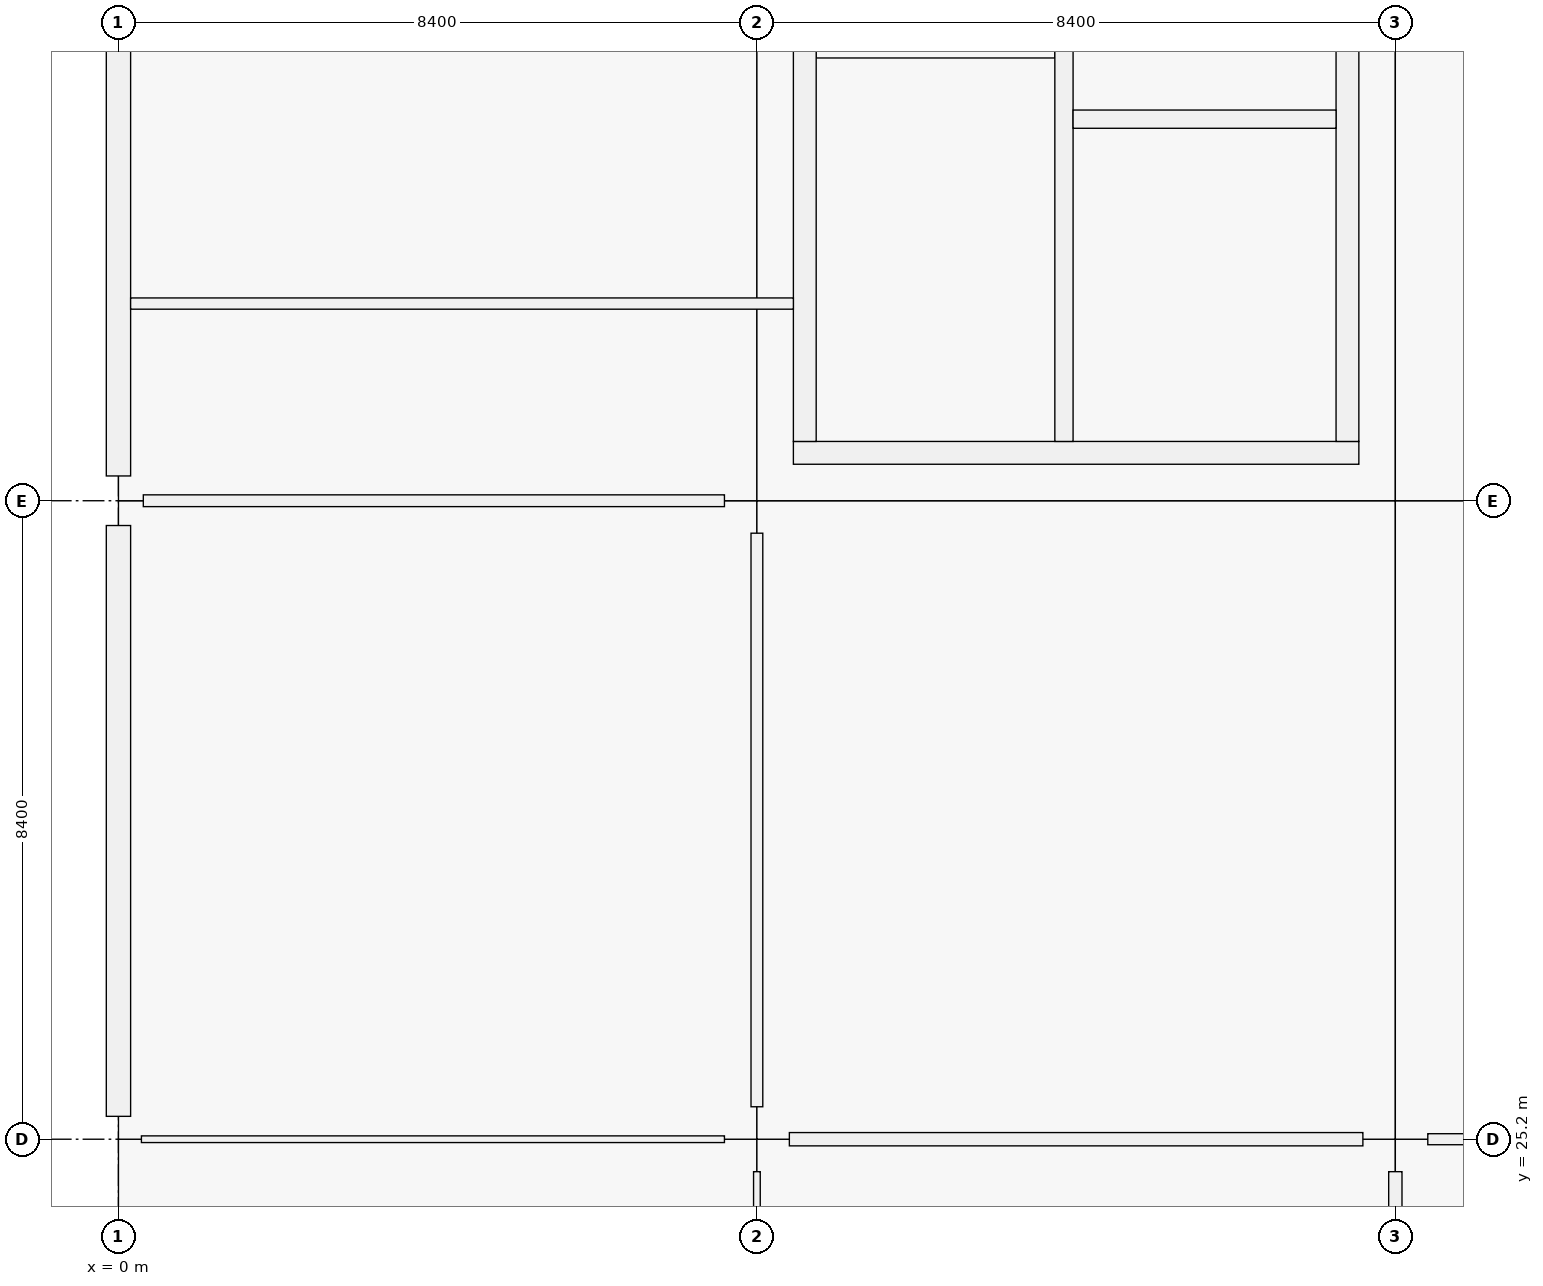
"""IFC4 building model, lengths in metres.
Left out: names, types, materials, properties, quantities, classifications, styles, units other than length and angle.
Written with IfcOpenShell. Run it as: python <this file> out.ifc"""

import sys

from ifc_helpers import new_model, si_unit, direction, frame, frame_2d, origin, origin_2d, place, context, subcontext, project, spatial, rectangle, extrude, element, fill, save


model = new_model("IFC4")
c1 = context("Model", 3, precision=1e-05, world=origin(), true_north=direction((0.0, 1.0)))
c2 = subcontext(c1, "Body", "Model", "MODEL_VIEW")
j1 = project(units=[si_unit("LENGTHUNIT", "METRE"), si_unit("PLANEANGLEUNIT", "RADIAN")], contexts=[c1])
p1 = place(None, origin())
s1 = spatial("IfcSite", under=j1, at=p1, CompositionType="ELEMENT")
p2 = place(p1, origin())
s2 = spatial("IfcBuilding", under=s1, at=p2, CompositionType="ELEMENT")
p3 = place(p2, origin())
s3 = spatial("IfcBuildingStorey", under=s2, at=p3, CompositionType="ELEMENT", Elevation=0.0)
p4 = place(p3, frame((0.0, 25.2, 0.0), z_axis=(0.0, 0.0, 1.0), x_axis=(1.0, 0.0, 0.0)))
e1 = element("IfcColumn", 1, at=p4, inside=s3, PredefinedType="COLUMN", context=c2, shape_type="SweptSolid", body=[
    extrude(rectangle(XDim=0.6, YDim=0.6, at=origin_2d()), origin(), (0.0, 0.0, 1.0), 5.76),
])
p5 = place(p3, frame((0.0, 33.6, 0.0), z_axis=(0.0, 0.0, 1.0), x_axis=(1.0, 0.0, 0.0)))
e2 = element("IfcColumn", 2, at=p5, inside=s3, PredefinedType="COLUMN", context=c2, shape_type="SweptSolid", body=[
    extrude(rectangle(XDim=0.65, YDim=0.65, at=origin_2d()), origin(), (0.0, 0.0, 1.0), 5.76),
])
for number, where, z_axis, x_axis in (
    (3, (8.4, 25.2, 0.0), (0.0, 0.0, 1.0), (1.0, 0.0, 0.0)),
    (4, (8.4, 33.6, 0.0), (0.0, 0.0, 1.0), (1.0, 0.0, 0.0)),
    (5, (16.8, 25.2, 0.0), (0.0, 0.0, 1.0), (1.0, 0.0, 0.0)),
    (6, (16.8, 33.6, 0.0), (0.0, 0.0, 1.0), (1.0, 0.0, 0.0)),
):
    element("IfcColumn", number, at=place(p3, frame(where, z_axis=z_axis, x_axis=x_axis)), inside=s3, PredefinedType="COLUMN", context=c2, shape_type="SweptSolid", body=[
        extrude(rectangle(XDim=0.85, YDim=0.85, at=origin_2d()), origin(), (0.0, 0.0, 1.0), 5.76),
    ])
p6 = place(p3, frame((0.0, 25.501, 0.0), z_axis=(0.0, 0.0, 1.0), x_axis=(0.0, 1.0, 0.0)))
e7 = element("IfcWall", 7, at=p6, inside=s3, PredefinedType="SOLIDWALL", context=c2, shape_type="SweptSolid", body=[
    extrude(rectangle(XDim=7.773, YDim=0.32, at=frame_2d((3.886, 0.0))), origin(), (0.0, 0.0, 1.0), 4.7),
])
p7 = place(p6, frame((2.786, 0.0, 0.0)))
e8 = element("IfcOpeningElement", 8, at=p7, cuts=e7, PredefinedType="OPENING", context=c2, shape_type="SweptSolid", body=[
    extrude(rectangle(XDim=2.2, YDim=2.3, at=frame_2d((1.1, 1.15))), frame((0.0, 0.16, 0.0), z_axis=(0.0, -1.0, 0.0), x_axis=(1.0, 0.0, 0.0)), (0.0, 0.0, 1.0), 0.32),
])
p8 = place(p3, frame((0.0, 33.926, 0.0), z_axis=(0.0, 0.0, 1.0), x_axis=(0.0, 1.0, 0.0)))
e9 = element("IfcWall", 9, at=p8, inside=s3, PredefinedType="SOLIDWALL", context=c2, shape_type="SweptSolid", body=[
    extrude(rectangle(XDim=7.773, YDim=0.32, at=frame_2d((3.886, 0.0))), origin(), (0.0, 0.0, 1.0), 4.7),
])
p9 = place(p8, frame((2.686, 0.0, 0.9)))
e10 = element("IfcOpeningElement", 10, at=p9, cuts=e9, PredefinedType="OPENING", context=c2, shape_type="SweptSolid", body=[
    extrude(rectangle(XDim=2.4, YDim=1.8, at=frame_2d((1.2, 0.9))), frame((0.0, 0.16, 0.0), z_axis=(0.0, -1.0, 0.0), x_axis=(1.0, 0.0, 0.0)), (0.0, 0.0, 1.0), 0.32),
])
p10 = place(p8, frame((0.124, 0.0, 0.0)))
e11 = element("IfcOpeningElement", 11, at=p10, cuts=e9, PredefinedType="OPENING", context=c2, shape_type="SweptSolid", body=[
    extrude(rectangle(XDim=2.0, YDim=2.25, at=frame_2d((1.0, 1.125))), frame((0.0, 0.16, 0.0), z_axis=(0.0, -1.0, 0.0), x_axis=(1.0, 0.0, 0.0)), (0.0, 0.0, 1.0), 0.32),
])
p11 = place(p3, frame((16.32, 34.23, 0.0), z_axis=(0.0, 0.0, 1.0), x_axis=(-1.0, 0.0, 0.0)))
e12 = element("IfcWall", 12, at=p11, inside=s3, PredefinedType="SHEAR", context=c2, shape_type="SweptSolid", body=[
    extrude(rectangle(XDim=7.44, YDim=0.3, at=frame_2d((3.72, 0.0))), origin(), (0.0, 0.0, 1.0), 5.76),
])
p12 = place(p11, frame((1.28, 0.0, 0.0)))
e13 = element("IfcOpeningElement", 13, at=p12, cuts=e12, PredefinedType="OPENING", context=c2, shape_type="SweptSolid", body=[
    extrude(rectangle(XDim=1.5, YDim=2.15, at=frame_2d((0.75, 1.075))), frame((0.0, 0.15, 0.0), z_axis=(0.0, -1.0, 0.0), x_axis=(1.0, 0.0, 0.0)), (0.0, 0.0, 1.0), 0.3),
])
p13 = place(p3, frame((9.03, 34.38, 0.0), z_axis=(0.0, 0.0, 1.0), x_axis=(0.0, 1.0, 0.0)))
e14 = element("IfcWall", 14, at=p13, inside=s3, PredefinedType="SHEAR", context=c2, shape_type="SweptSolid", body=[
    extrude(rectangle(XDim=6.84, YDim=0.3, at=frame_2d((3.42, 0.0))), origin(), (0.0, 0.0, 1.0), 5.76),
])
p14 = place(p13, frame((0.12, 0.0, 0.0)))
e15 = element("IfcOpeningElement", 15, at=p14, cuts=e14, PredefinedType="OPENING", context=c2, shape_type="SweptSolid", body=[
    extrude(rectangle(XDim=1.0, YDim=2.15, at=frame_2d((0.5, 1.075))), frame((0.0, 0.15, 0.0), z_axis=(0.0, -1.0, 0.0), x_axis=(1.0, 0.0, 0.0)), (0.0, 0.0, 1.0), 0.3),
])
p15 = place(p3, frame((16.17, 41.22, 0.0), z_axis=(0.0, 0.0, 1.0), x_axis=(0.0, -1.0, 0.0)))
e16 = element("IfcWall", 16, at=p15, inside=s3, PredefinedType="SHEAR", context=c2, shape_type="SweptSolid", body=[
    extrude(rectangle(XDim=6.84, YDim=0.3, at=frame_2d((3.42, 0.0))), origin(), (0.0, 0.0, 1.0), 5.76),
])
p16 = place(p3, frame((12.44, 34.38, 0.0), z_axis=(0.0, 0.0, 1.0), x_axis=(0.0, 1.0, 0.0)))
e17 = element("IfcWall", 17, at=p16, inside=s3, PredefinedType="SHEAR", context=c2, shape_type="SweptSolid", body=[
    extrude(rectangle(XDim=6.84, YDim=0.24, at=frame_2d((3.42, 0.0))), origin(), (0.0, 0.0, 1.0), 5.76),
])
p17 = place(p16, frame((0.12, 0.0, 0.0)))
e18 = element("IfcOpeningElement", 18, at=p17, cuts=e17, PredefinedType="OPENING", context=c2, shape_type="SweptSolid", body=[
    extrude(rectangle(XDim=1.0, YDim=2.15, at=frame_2d((0.5, 1.075))), frame((0.0, 0.12, 0.0), z_axis=(0.0, -1.0, 0.0), x_axis=(1.0, 0.0, 0.0)), (0.0, 0.0, 1.0), 0.24),
])
p18 = place(p3, frame((12.56, 38.62, 0.0), z_axis=(0.0, 0.0, 1.0), x_axis=(1.0, 0.0, 0.0)))
e19 = element("IfcWall", 19, at=p18, inside=s3, PredefinedType="SHEAR", context=c2, shape_type="SweptSolid", body=[
    extrude(rectangle(XDim=3.46, YDim=0.24, at=frame_2d((1.73, 0.0))), origin(), (0.0, 0.0, 1.0), 5.76),
])
p19 = place(p18, frame((1.18, 0.0, 0.0)))
e20 = element("IfcOpeningElement", 20, at=p19, cuts=e19, PredefinedType="OPENING", context=c2, shape_type="SweptSolid", body=[
    extrude(rectangle(XDim=1.1, YDim=2.15, at=frame_2d((0.55, 1.075))), frame((0.0, 0.12, 0.0), z_axis=(0.0, -1.0, 0.0), x_axis=(1.0, 0.0, 0.0)), (0.0, 0.0, 1.0), 0.24),
])
p20 = place(p3, frame((0.302, 25.2, 0.0), z_axis=(0.0, 0.0, 1.0), x_axis=(1.0, 0.0, 0.0)))
e21 = element("IfcWall", 21, at=p20, inside=s3, PredefinedType="PARTITIONING", context=c2, shape_type="SweptSolid", body=[
    extrude(rectangle(XDim=7.671, YDim=0.088, at=frame_2d((3.835, 0.0))), origin(), (0.0, 0.0, 1.0), 3.66),
])
p21 = place(p20, frame((3.311, 0.0, 0.0)))
e22 = element("IfcOpeningElement", 22, at=p21, cuts=e21, PredefinedType="OPENING", context=c2, shape_type="SweptSolid", body=[
    extrude(rectangle(XDim=1.05, YDim=2.12, at=frame_2d((0.525, 1.06))), frame((0.0, 0.044, 0.0), z_axis=(0.0, -1.0, 0.0), x_axis=(1.0, 0.0, 0.0)), (0.0, 0.0, 1.0), 0.088),
])
p22 = place(p3, frame((0.327, 33.6, 0.0), z_axis=(0.0, 0.0, 1.0), x_axis=(1.0, 0.0, 0.0)))
e23 = element("IfcWall", 23, at=p22, inside=s3, PredefinedType="PARTITIONING", context=c2, shape_type="SweptSolid", body=[
    extrude(rectangle(XDim=7.646, YDim=0.155, at=frame_2d((3.823, 0.0))), origin(), (0.0, 0.0, 1.0), 3.66),
])
p23 = place(p22, frame((3.283, 0.0, 0.0)))
e24 = element("IfcOpeningElement", 24, at=p23, cuts=e23, PredefinedType="OPENING", context=c2, shape_type="SweptSolid", body=[
    extrude(rectangle(XDim=1.08, YDim=2.25, at=frame_2d((0.54, 1.125))), frame((0.0, 0.078, 0.0), z_axis=(0.0, -1.0, 0.0), x_axis=(1.0, 0.0, 0.0)), (0.0, 0.0, 1.0), 0.155),
])
p24 = place(p3, frame((8.827, 25.2, 0.0), z_axis=(0.0, 0.0, 1.0), x_axis=(1.0, 0.0, 0.0)))
e25 = element("IfcWall", 25, at=p24, inside=s3, PredefinedType="PARTITIONING", context=c2, shape_type="SweptSolid", body=[
    extrude(rectangle(XDim=7.546, YDim=0.175, at=frame_2d((3.773, 0.0))), origin(), (0.0, 0.0, 1.0), 3.66),
])
p25 = place(p24, frame((3.253, 0.0, 0.0)))
e26 = element("IfcOpeningElement", 26, at=p25, cuts=e25, PredefinedType="OPENING", context=c2, shape_type="SweptSolid", body=[
    extrude(rectangle(XDim=1.04, YDim=2.2, at=frame_2d((0.52, 1.1))), frame((0.0, 0.087, 0.0), z_axis=(0.0, -1.0, 0.0), x_axis=(1.0, 0.0, 0.0)), (0.0, 0.0, 1.0), 0.175),
])
p26 = place(p3, frame((17.227, 25.2, 0.0), z_axis=(0.0, 0.0, 1.0), x_axis=(1.0, 0.0, 0.0)))
e27 = element("IfcWall", 27, at=p26, inside=s3, PredefinedType="PARTITIONING", context=c2, shape_type="SweptSolid", body=[
    extrude(rectangle(XDim=7.546, YDim=0.145, at=frame_2d((3.773, 0.0))), origin(), (0.0, 0.0, 1.0), 3.66),
])
p27 = place(p26, frame((3.273, 0.0, 0.0)))
e28 = element("IfcOpeningElement", 28, at=p27, cuts=e27, PredefinedType="OPENING", context=c2, shape_type="SweptSolid", body=[
    extrude(rectangle(XDim=1.0, YDim=2.2, at=frame_2d((0.5, 1.1))), frame((0.0, 0.073, 0.0), z_axis=(0.0, -1.0, 0.0), x_axis=(1.0, 0.0, 0.0)), (0.0, 0.0, 1.0), 0.145),
])
p28 = place(p3, frame((8.4, 17.227, 0.0), z_axis=(0.0, 0.0, 1.0), x_axis=(0.0, 1.0, 0.0)))
e29 = element("IfcWall", 29, at=p28, inside=s3, PredefinedType="PARTITIONING", context=c2, shape_type="SweptSolid", body=[
    extrude(rectangle(XDim=7.546, YDim=0.088, at=frame_2d((3.773, 0.0))), origin(), (0.0, 0.0, 1.0), 3.66),
])
p29 = place(p28, frame((3.293, 0.0, 0.0)))
e30 = element("IfcOpeningElement", 30, at=p29, cuts=e29, PredefinedType="OPENING", context=c2, shape_type="SweptSolid", body=[
    extrude(rectangle(XDim=0.96, YDim=2.18, at=frame_2d((0.48, 1.09))), frame((0.0, 0.044, 0.0), z_axis=(0.0, -1.0, 0.0), x_axis=(1.0, 0.0, 0.0)), (0.0, 0.0, 1.0), 0.088),
])
p30 = place(p3, frame((8.4, 25.627, 0.0), z_axis=(0.0, 0.0, 1.0), x_axis=(0.0, 1.0, 0.0)))
e31 = element("IfcWall", 31, at=p30, inside=s3, PredefinedType="PARTITIONING", context=c2, shape_type="SweptSolid", body=[
    extrude(rectangle(XDim=7.546, YDim=0.155, at=frame_2d((3.773, 0.0))), origin(), (0.0, 0.0, 1.0), 3.66),
])
p31 = place(p30, frame((3.253, 0.0, 0.0)))
e32 = element("IfcOpeningElement", 32, at=p31, cuts=e31, PredefinedType="OPENING", context=c2, shape_type="SweptSolid", body=[
    extrude(rectangle(XDim=1.04, YDim=2.2, at=frame_2d((0.52, 1.1))), frame((0.0, 0.078, 0.0), z_axis=(0.0, -1.0, 0.0), x_axis=(1.0, 0.0, 0.0)), (0.0, 0.0, 1.0), 0.155),
])
p32 = place(p3, frame((16.8, 17.227, 0.0), z_axis=(0.0, 0.0, 1.0), x_axis=(0.0, 1.0, 0.0)))
e33 = element("IfcWall", 33, at=p32, inside=s3, PredefinedType="PARTITIONING", context=c2, shape_type="SweptSolid", body=[
    extrude(rectangle(XDim=7.546, YDim=0.175, at=frame_2d((3.773, 0.0))), origin(), (0.0, 0.0, 1.0), 3.66),
])
p33 = place(p32, frame((3.313, 0.0, 0.0)))
e34 = element("IfcOpeningElement", 34, at=p33, cuts=e33, PredefinedType="OPENING", context=c2, shape_type="SweptSolid", body=[
    extrude(rectangle(XDim=0.92, YDim=2.15, at=frame_2d((0.46, 1.075))), frame((0.0, 0.087, 0.0), z_axis=(0.0, -1.0, 0.0), x_axis=(1.0, 0.0, 0.0)), (0.0, 0.0, 1.0), 0.175),
])
p34 = place(p3, frame((0.16, 36.194, 0.0), z_axis=(0.0, 0.0, 1.0), x_axis=(1.0, 0.0, 0.0)))
e35 = element("IfcWall", 35, at=p34, inside=s3, PredefinedType="PARTITIONING", context=c2, shape_type="SweptSolid", body=[
    extrude(rectangle(XDim=8.72, YDim=0.148, at=frame_2d((4.36, 0.0))), origin(), (0.0, 0.0, 1.0), 3.66),
])
p35 = place(p7, origin())
e36 = element("IfcDoor", 36, at=p35, inside=s3, OperationType="DOUBLE_DOOR_SINGLE_SWING", PredefinedType="DOOR", context=c2, shape_type="SweptSolid", body=[
    extrude(rectangle(XDim=2.2, YDim=2.3, at=frame_2d((1.1, 1.15))), frame((0.0, 0.025, 0.0), z_axis=(0.0, -1.0, 0.0), x_axis=(1.0, 0.0, 0.0)), (0.0, 0.0, 1.0), 0.05),
])
fill(e8, e36)
p36 = place(p9, origin())
e37 = element("IfcWindow", 37, at=p36, inside=s3, PartitioningType="SINGLE_PANEL", PredefinedType="WINDOW", context=c2, shape_type="SweptSolid", body=[
    extrude(rectangle(XDim=2.4, YDim=1.8, at=frame_2d((1.2, 0.9))), frame((0.0, 0.03, 0.0), z_axis=(0.0, -1.0, 0.0), x_axis=(1.0, 0.0, 0.0)), (0.0, 0.0, 1.0), 0.06),
])
fill(e10, e37)
p37 = place(p10, origin())
e38 = element("IfcDoor", 38, at=p37, inside=s3, OperationType="DOUBLE_DOOR_SINGLE_SWING", PredefinedType="DOOR", context=c2, shape_type="SweptSolid", body=[
    extrude(rectangle(XDim=2.0, YDim=2.25, at=frame_2d((1.0, 1.125))), frame((0.0, 0.025, 0.0), z_axis=(0.0, -1.0, 0.0), x_axis=(1.0, 0.0, 0.0)), (0.0, 0.0, 1.0), 0.05),
])
fill(e11, e38)
p38 = place(p17, origin())
e39 = element("IfcDoor", 39, at=p38, inside=s3, OperationType="SINGLE_SWING_RIGHT", PredefinedType="DOOR", context=c2, shape_type="SweptSolid", body=[
    extrude(rectangle(XDim=1.0, YDim=2.15, at=frame_2d((0.5, 1.075))), frame((0.0, 0.025, 0.0), z_axis=(0.0, -1.0, 0.0), x_axis=(1.0, 0.0, 0.0)), (0.0, 0.0, 1.0), 0.05),
])
fill(e18, e39)
p39 = place(p12, origin())
e40 = element("IfcDoor", 40, at=p39, inside=s3, OperationType="DOUBLE_DOOR_SINGLE_SWING", PredefinedType="DOOR", context=c2, shape_type="SweptSolid", body=[
    extrude(rectangle(XDim=1.5, YDim=2.15, at=frame_2d((0.75, 1.075))), frame((0.0, 0.025, 0.0), z_axis=(0.0, -1.0, 0.0), x_axis=(1.0, 0.0, 0.0)), (0.0, 0.0, 1.0), 0.05),
])
fill(e13, e40)
p40 = place(p14, origin())
e41 = element("IfcDoor", 41, at=p40, inside=s3, OperationType="SINGLE_SWING_LEFT", PredefinedType="DOOR", context=c2, shape_type="SweptSolid", body=[
    extrude(rectangle(XDim=1.0, YDim=2.15, at=frame_2d((0.5, 1.075))), frame((0.0, 0.025, 0.0), z_axis=(0.0, -1.0, 0.0), x_axis=(1.0, 0.0, 0.0)), (0.0, 0.0, 1.0), 0.05),
])
fill(e15, e41)
p41 = place(p19, origin())
e42 = element("IfcDoor", 42, at=p41, inside=s3, OperationType="DOUBLE_DOOR_SLIDING", PredefinedType="DOOR", context=c2, shape_type="SweptSolid", body=[
    extrude(rectangle(XDim=1.1, YDim=2.15, at=frame_2d((0.55, 1.075))), frame((0.0, 0.025, 0.0), z_axis=(0.0, -1.0, 0.0), x_axis=(1.0, 0.0, 0.0)), (0.0, 0.0, 1.0), 0.05),
])
fill(e20, e42)
p42 = place(p25, origin())
e43 = element("IfcDoor", 43, at=p42, inside=s3, OperationType="SINGLE_SWING_LEFT", PredefinedType="DOOR", context=c2, shape_type="SweptSolid", body=[
    extrude(rectangle(XDim=1.04, YDim=2.2, at=frame_2d((0.52, 1.1))), frame((0.0, 0.025, 0.0), z_axis=(0.0, -1.0, 0.0), x_axis=(1.0, 0.0, 0.0)), (0.0, 0.0, 1.0), 0.05),
])
fill(e26, e43)
p43 = place(p31, origin())
e44 = element("IfcDoor", 44, at=p43, inside=s3, OperationType="SINGLE_SWING_RIGHT", PredefinedType="DOOR", context=c2, shape_type="SweptSolid", body=[
    extrude(rectangle(XDim=1.04, YDim=2.2, at=frame_2d((0.52, 1.1))), frame((0.0, 0.025, 0.0), z_axis=(0.0, -1.0, 0.0), x_axis=(1.0, 0.0, 0.0)), (0.0, 0.0, 1.0), 0.05),
])
fill(e32, e44)
p44 = place(p23, origin())
e45 = element("IfcDoor", 45, at=p44, inside=s3, OperationType="SINGLE_SWING_RIGHT", PredefinedType="DOOR", context=c2, shape_type="SweptSolid", body=[
    extrude(rectangle(XDim=1.08, YDim=2.25, at=frame_2d((0.54, 1.125))), frame((0.0, 0.025, 0.0), z_axis=(0.0, -1.0, 0.0), x_axis=(1.0, 0.0, 0.0)), (0.0, 0.0, 1.0), 0.05),
])
fill(e24, e45)
p45 = place(p21, origin())
e46 = element("IfcDoor", 46, at=p45, inside=s3, OperationType="SINGLE_SWING_LEFT", PredefinedType="DOOR", context=c2, shape_type="SweptSolid", body=[
    extrude(rectangle(XDim=1.05, YDim=2.12, at=frame_2d((0.525, 1.06))), frame((0.0, 0.025, 0.0), z_axis=(0.0, -1.0, 0.0), x_axis=(1.0, 0.0, 0.0)), (0.0, 0.0, 1.0), 0.05),
])
fill(e22, e46)
save(model, sys.argv[1])
